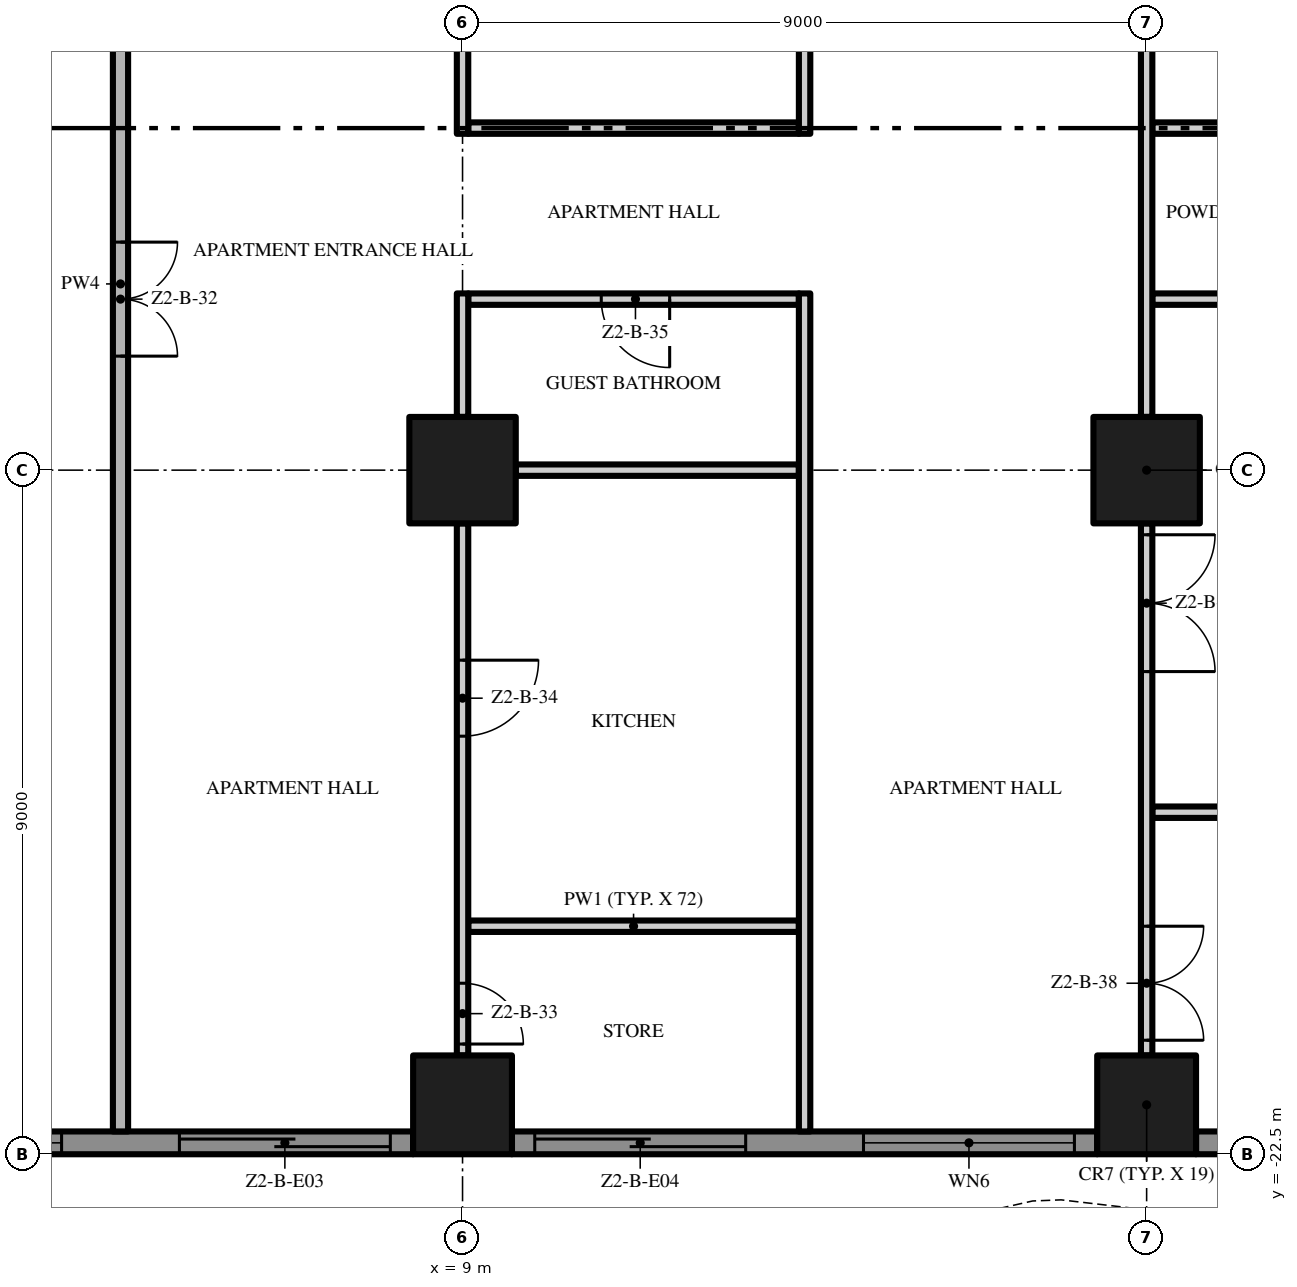
"""IFC4 building model, lengths in metres.
Left out: names, types, materials, properties, quantities, classifications, styles, units other than length and angle.
Written with IfcOpenShell. Run it as: python <this file> out.ifc"""

import sys

from ifc_helpers import new_model, si_unit, direction, frame, frame_2d, origin, origin_2d, place, context, subcontext, project, spatial, polyline, rectangle, outline, extrude, element, fill, save


model = new_model("IFC4")
c1 = context("Model", 3, precision=1e-05, world=origin(), true_north=direction((0.0, 1.0)))
c2 = subcontext(c1, "Body", "Model", "MODEL_VIEW")
j1 = project(units=[si_unit("LENGTHUNIT", "METRE"), si_unit("PLANEANGLEUNIT", "RADIAN")], contexts=[c1])
p1 = place(None, origin())
s1 = spatial("IfcSite", under=j1, at=p1, CompositionType="ELEMENT")
p2 = place(p1, origin())
s2 = spatial("IfcBuilding", under=s1, at=p2, CompositionType="ELEMENT")
p3 = place(p2, frame((0.0, 0.0, 80.8)))
s3 = spatial("IfcBuildingStorey", under=s2, at=p3, CompositionType="ELEMENT", Elevation=80.8)
p4 = place(p3, frame((18.0, -13.5, 0.0), z_axis=(0.0, 0.0, 1.0), x_axis=(1.0, 0.0, 0.0)))
e1 = element("IfcColumn", 1, at=p4, inside=s3, PredefinedType="COLUMN", context=c2, shape_type="SweptSolid", body=[
    extrude(rectangle(XDim=1.4, YDim=1.4, at=origin_2d()), origin(), (0.0, 0.0, 1.0), 3.5),
])
p5 = place(p3, frame((18.0, -21.85, 0.0), z_axis=(0.0, 0.0, 1.0), x_axis=(1.0, 0.0, 0.0)))
e2 = element("IfcColumn", 2, at=p5, inside=s3, PredefinedType="COLUMN", context=c2, shape_type="SweptSolid", body=[
    extrude(rectangle(XDim=1.3, YDim=1.3, at=origin_2d()), origin(), (0.0, 0.0, 1.0), 3.5),
])
p6 = place(p3, frame((9.0, -13.5, 0.0), z_axis=(0.0, 0.0, 1.0), x_axis=(1.0, 0.0, 0.0)))
e3 = element("IfcColumn", 3, at=p6, inside=s3, PredefinedType="COLUMN", context=c2, shape_type="SweptSolid", body=[
    extrude(rectangle(XDim=1.4, YDim=1.4, at=origin_2d()), origin(), (0.0, 0.0, 1.0), 3.5),
])
p7 = place(p3, frame((9.0, -21.85, 0.0), z_axis=(0.0, 0.0, 1.0), x_axis=(1.0, 0.0, 0.0)))
e4 = element("IfcColumn", 4, at=p7, inside=s3, PredefinedType="COLUMN", context=c2, shape_type="SweptSolid", body=[
    extrude(rectangle(XDim=1.3, YDim=1.3, at=origin_2d()), origin(), (0.0, 0.0, 1.0), 3.5),
])
p8 = place(p3, frame((8.35, -22.35, 0.0), z_axis=(0.0, 0.0, 1.0), x_axis=(-1.0, 0.0, 0.0)))
e5 = element("IfcWall", 5, at=p8, inside=s3, PredefinedType="SOLIDWALL", context=c2, shape_type="SweptSolid", body=[
    extrude(rectangle(XDim=7.7, YDim=0.3, at=frame_2d((3.85, 0.0))), origin(), (0.0, 0.0, 1.0), 3.5),
])
p9 = place(p8, frame((4.625, 0.0, 0.45)))
e6 = element("IfcOpeningElement", 6, at=p9, cuts=e5, PredefinedType="OPENING", context=c2, shape_type="SweptSolid", body=[
    extrude(rectangle(XDim=2.775, YDim=2.65, at=frame_2d((1.387, 1.325))), frame((0.0, 0.16, 0.0), z_axis=(0.0, -1.0, 0.0), x_axis=(1.0, 0.0, 0.0)), (0.0, 0.0, 1.0), 0.32),
])
p10 = place(p8, frame((0.3, 0.0, 0.0)))
e7 = element("IfcOpeningElement", 7, at=p10, cuts=e5, PredefinedType="OPENING", context=c2, shape_type="SweptSolid", body=[
    extrude(rectangle(XDim=2.775, YDim=2.4, at=frame_2d((1.387, 1.2))), frame((0.0, 0.16, 0.0), z_axis=(0.0, -1.0, 0.0), x_axis=(1.0, 0.0, 0.0)), (0.0, 0.0, 1.0), 0.32),
])
p11 = place(p3, frame((17.35, -22.35, 0.0), z_axis=(0.0, 0.0, 1.0), x_axis=(-1.0, 0.0, 0.0)))
e8 = element("IfcWall", 8, at=p11, inside=s3, PredefinedType="SOLIDWALL", context=c2, shape_type="SweptSolid", body=[
    extrude(rectangle(XDim=7.7, YDim=0.3, at=frame_2d((3.85, 0.0))), origin(), (0.0, 0.0, 1.0), 3.5),
])
p12 = place(p11, frame((4.625, 0.0, 0.0)))
e9 = element("IfcOpeningElement", 9, at=p12, cuts=e8, PredefinedType="OPENING", context=c2, shape_type="SweptSolid", body=[
    extrude(rectangle(XDim=2.775, YDim=2.4, at=frame_2d((1.387, 1.2))), frame((0.0, 0.16, 0.0), z_axis=(0.0, -1.0, 0.0), x_axis=(1.0, 0.0, 0.0)), (0.0, 0.0, 1.0), 0.32),
])
p13 = place(p11, frame((0.3, 0.0, 0.45)))
e10 = element("IfcOpeningElement", 10, at=p13, cuts=e8, PredefinedType="OPENING", context=c2, shape_type="SweptSolid", body=[
    extrude(rectangle(XDim=2.775, YDim=2.65, at=frame_2d((1.387, 1.325))), frame((0.0, 0.16, 0.0), z_axis=(0.0, -1.0, 0.0), x_axis=(1.0, 0.0, 0.0)), (0.0, 0.0, 1.0), 0.32),
])
p14 = place(p3, frame((22.5, -22.35, 0.0), z_axis=(0.0, 0.0, 1.0), x_axis=(-1.0, 0.0, 0.0)))
e11 = element("IfcWall", 11, at=p14, inside=s3, PredefinedType="SOLIDWALL", context=c2, shape_type="SweptSolid", body=[
    extrude(rectangle(XDim=3.85, YDim=0.3, at=frame_2d((1.925, 0.0))), origin(), (0.0, 0.0, 1.0), 3.5),
])
p15 = place(p14, frame((0.775, 0.0, 0.45)))
e12 = element("IfcOpeningElement", 12, at=p15, cuts=e11, PredefinedType="OPENING", context=c2, shape_type="SweptSolid", body=[
    extrude(rectangle(XDim=2.775, YDim=2.65, at=frame_2d((1.387, 1.325))), frame((0.0, 0.16, 0.0), z_axis=(0.0, -1.0, 0.0), x_axis=(1.0, 0.0, 0.0)), (0.0, 0.0, 1.0), 0.32),
])
p16 = place(p3, origin())
e13 = element("IfcWall", 13, at=p16, inside=s3, PredefinedType="USERDEFINED", context=c2, shape_type="SweptSolid", body=[
    extrude(outline(polyline([(-22.5, -25.149), (-21.0, -25.485), (-20.625, -25.5), (-19.5, -25.369), (-18.0, -24.845), (-16.5, -24.112), (-15.0, -23.451), (-13.5, -23.115), (-13.125, -23.1), (-12.0, -23.231), (-10.5, -23.755), (-9.0, -24.488), (-7.5, -25.149), (-6.0, -25.485), (-5.625, -25.5), (-4.5, -25.369), (-3.0, -24.845), (-1.5, -24.112), (0.0, -23.451), (1.5, -23.115), (1.875, -23.1), (3.0, -23.231), (4.5, -23.755), (6.0, -24.488), (7.5, -25.149), (9.0, -25.485), (9.375, -25.5), (10.5, -25.369), (12.0, -24.845), (13.5, -24.112), (15.0, -23.451), (16.5, -23.115), (16.875, -23.1), (18.0, -23.231), (19.5, -23.755), (21.0, -24.488), (22.5, -25.149), (22.601, -24.92), (21.105, -24.261), (19.596, -23.524), (18.056, -22.986), (16.885, -22.849), (16.467, -22.866), (14.921, -23.213), (13.395, -23.885), (11.904, -24.614), (10.444, -25.124), (9.365, -25.249), (9.033, -25.236), (7.579, -24.91), (6.105, -24.261), (4.596, -23.524), (3.056, -22.986), (1.885, -22.849), (1.467, -22.866), (-0.079, -23.213), (-1.605, -23.885), (-3.096, -24.614), (-4.556, -25.124), (-5.635, -25.249), (-5.967, -25.236), (-7.421, -24.91), (-8.895, -24.261), (-10.404, -23.524), (-11.944, -22.986), (-13.115, -22.849), (-13.533, -22.866), (-15.079, -23.213), (-16.605, -23.885), (-18.096, -24.614), (-19.556, -25.124), (-20.635, -25.249), (-20.967, -25.236), (-22.445, -24.905), (-22.5, -25.149)])), origin(), (0.0, 0.0, 1.0), 0.9),
])
p17 = place(p3, frame((9.075, -19.5, 0.0), z_axis=(0.0, 0.0, 1.0), x_axis=(1.0, 0.0, 0.0)))
e14 = element("IfcWall", 14, at=p17, inside=s3, PredefinedType="PARTITIONING", context=c2, shape_type="SweptSolid", body=[
    extrude(rectangle(XDim=4.35, YDim=0.15, at=frame_2d((2.175, 0.0))), origin(), (0.0, 0.0, 1.0), 3.5),
])
p18 = place(p3, frame((18.075, -18.0, 0.0), z_axis=(0.0, 0.0, 1.0), x_axis=(1.0, 0.0, 0.0)))
e15 = element("IfcWall", 15, at=p18, inside=s3, PredefinedType="PARTITIONING", context=c2, shape_type="SweptSolid", body=[
    extrude(rectangle(XDim=3.775, YDim=0.15, at=frame_2d((1.887, 0.0))), origin(), (0.0, 0.0, 1.0), 3.5),
])
p19 = place(p3, frame((9.7, -13.5, 0.0), z_axis=(0.0, 0.0, 1.0), x_axis=(1.0, 0.0, 0.0)))
e16 = element("IfcWall", 16, at=p19, inside=s3, PredefinedType="PARTITIONING", context=c2, shape_type="SweptSolid", body=[
    extrude(rectangle(XDim=3.725, YDim=0.15, at=frame_2d((1.863, 0.0))), origin(), (0.0, 0.0, 1.0), 3.5),
])
p20 = place(p3, frame((13.425, -11.25, 0.0), z_axis=(0.0, 0.0, 1.0), x_axis=(-1.0, 0.0, 0.0)))
e17 = element("IfcWall", 17, at=p20, inside=s3, PredefinedType="PARTITIONING", context=c2, shape_type="SweptSolid", body=[
    extrude(rectangle(XDim=4.35, YDim=0.15, at=frame_2d((2.175, 0.0))), origin(), (0.0, 0.0, 1.0), 3.5),
])
p21 = place(p20, frame((1.7, 0.0, 0.0)))
e18 = element("IfcOpeningElement", 18, at=p21, cuts=e17, PredefinedType="OPENING", context=c2, shape_type="SweptSolid", body=[
    extrude(rectangle(XDim=0.9, YDim=2.1, at=frame_2d((0.45, 1.05))), frame((0.0, 0.085, 0.0), z_axis=(0.0, -1.0, 0.0), x_axis=(1.0, 0.0, 0.0)), (0.0, 0.0, 1.0), 0.17),
])
p22 = place(p3, frame((18.075, -11.25, 0.0), z_axis=(0.0, 0.0, 1.0), x_axis=(1.0, 0.0, 0.0)))
e19 = element("IfcWall", 19, at=p22, inside=s3, PredefinedType="PARTITIONING", context=c2, shape_type="SweptSolid", body=[
    extrude(rectangle(XDim=2.85, YDim=0.15, at=frame_2d((1.425, 0.0))), origin(), (0.0, 0.0, 1.0), 3.5),
])
p23 = place(p3, frame((9.075, -9.0, 0.0), z_axis=(0.0, 0.0, 1.0), x_axis=(1.0, 0.0, 0.0)))
e20 = element("IfcWall", 20, at=p23, inside=s3, PredefinedType="PARTITIONING", context=c2, shape_type="SweptSolid", body=[
    extrude(rectangle(XDim=4.35, YDim=0.15, at=frame_2d((2.175, 0.0))), origin(), (0.0, 0.0, 1.0), 3.5),
])
p24 = place(p3, frame((18.075, -9.0, 0.0), z_axis=(0.0, 0.0, 1.0), x_axis=(1.0, 0.0, 0.0)))
e21 = element("IfcWall", 21, at=p24, inside=s3, PredefinedType="PARTITIONING", context=c2, shape_type="SweptSolid", body=[
    extrude(rectangle(XDim=2.85, YDim=0.15, at=frame_2d((1.425, 0.0))), origin(), (0.0, 0.0, 1.0), 3.5),
])
p25 = place(p3, frame((4.5, 0.1, 0.0), z_axis=(0.0, 0.0, 1.0), x_axis=(0.0, -1.0, 0.0)))
e22 = element("IfcWall", 22, at=p25, inside=s3, PredefinedType="PARTITIONING", context=c2, shape_type="SweptSolid", body=[
    extrude(rectangle(XDim=22.3, YDim=0.2, at=frame_2d((11.15, 0.0))), origin(), (0.0, 0.0, 1.0), 3.5),
])
p26 = place(p25, frame((10.6, 0.0, 0.0)))
e23 = element("IfcOpeningElement", 23, at=p26, cuts=e22, PredefinedType="OPENING", context=c2, shape_type="SweptSolid", body=[
    extrude(rectangle(XDim=1.5, YDim=2.4, at=frame_2d((0.75, 1.2))), frame((0.0, 0.11, 0.0), z_axis=(0.0, -1.0, 0.0), x_axis=(1.0, 0.0, 0.0)), (0.0, 0.0, 1.0), 0.22),
])
p27 = place(p3, frame((9.0, -14.2, 0.0), z_axis=(0.0, 0.0, 1.0), x_axis=(0.0, -1.0, 0.0)))
e24 = element("IfcWall", 24, at=p27, inside=s3, PredefinedType="PARTITIONING", context=c2, shape_type="SweptSolid", body=[
    extrude(rectangle(XDim=7.0, YDim=0.15, at=frame_2d((3.5, 0.0))), origin(), (0.0, 0.0, 1.0), 3.5),
])
p28 = place(p27, frame((6.05, 0.0, 0.0)))
e25 = element("IfcOpeningElement", 25, at=p28, cuts=e24, PredefinedType="OPENING", context=c2, shape_type="SweptSolid", body=[
    extrude(rectangle(XDim=0.8, YDim=2.0, at=frame_2d((0.4, 1.0))), frame((0.0, 0.085, 0.0), z_axis=(0.0, -1.0, 0.0), x_axis=(1.0, 0.0, 0.0)), (0.0, 0.0, 1.0), 0.17),
])
p29 = place(p27, frame((1.8, 0.0, 0.0)))
e26 = element("IfcOpeningElement", 26, at=p29, cuts=e24, PredefinedType="OPENING", context=c2, shape_type="SweptSolid", body=[
    extrude(rectangle(XDim=1.0, YDim=2.4, at=frame_2d((0.5, 1.2))), frame((0.0, 0.085, 0.0), z_axis=(0.0, -1.0, 0.0), x_axis=(1.0, 0.0, 0.0)), (0.0, 0.0, 1.0), 0.17),
])
p30 = place(p3, frame((9.0, -12.8, 0.0), z_axis=(0.0, 0.0, 1.0), x_axis=(0.0, 1.0, 0.0)))
e27 = element("IfcWall", 27, at=p30, inside=s3, PredefinedType="PARTITIONING", context=c2, shape_type="SweptSolid", body=[
    extrude(rectangle(XDim=1.625, YDim=0.15, at=frame_2d((0.812, 0.0))), origin(), (0.0, 0.0, 1.0), 3.5),
])
p31 = place(p3, frame((9.0, -5.2, 0.0), z_axis=(0.0, 0.0, 1.0), x_axis=(0.0, -1.0, 0.0)))
e28 = element("IfcWall", 28, at=p31, inside=s3, PredefinedType="PARTITIONING", context=c2, shape_type="SweptSolid", body=[
    extrude(rectangle(XDim=3.875, YDim=0.15, at=frame_2d((1.938, 0.0))), origin(), (0.0, 0.0, 1.0), 3.5),
])
p32 = place(p31, frame((0.75, 0.0, 0.0)))
e29 = element("IfcOpeningElement", 29, at=p32, cuts=e28, PredefinedType="OPENING", context=c2, shape_type="SweptSolid", body=[
    extrude(rectangle(XDim=0.9, YDim=2.1, at=frame_2d((0.45, 1.05))), frame((0.0, 0.085, 0.0), z_axis=(0.0, -1.0, 0.0), x_axis=(1.0, 0.0, 0.0)), (0.0, 0.0, 1.0), 0.17),
])
p33 = place(p3, frame((13.5, -22.2, 0.0), z_axis=(0.0, 0.0, 1.0), x_axis=(0.0, 1.0, 0.0)))
e30 = element("IfcWall", 30, at=p33, inside=s3, PredefinedType="PARTITIONING", context=c2, shape_type="SweptSolid", body=[
    extrude(rectangle(XDim=11.025, YDim=0.15, at=frame_2d((5.513, 0.0))), origin(), (0.0, 0.0, 1.0), 3.5),
])
p34 = place(p3, frame((13.5, -9.075, 0.0), z_axis=(0.0, 0.0, 1.0), x_axis=(0.0, 1.0, 0.0)))
e31 = element("IfcWall", 31, at=p34, inside=s3, PredefinedType="PARTITIONING", context=c2, shape_type="SweptSolid", body=[
    extrude(rectangle(XDim=8.975, YDim=0.15, at=frame_2d((4.487, 0.0))), origin(), (0.0, 0.0, 1.0), 3.5),
])
p35 = place(p3, frame((18.0, -14.2, 0.0), z_axis=(0.0, 0.0, 1.0), x_axis=(0.0, -1.0, 0.0)))
e32 = element("IfcWall", 32, at=p35, inside=s3, PredefinedType="PARTITIONING", context=c2, shape_type="SweptSolid", body=[
    extrude(rectangle(XDim=7.0, YDim=0.15, at=frame_2d((3.5, 0.0))), origin(), (0.0, 0.0, 1.0), 3.5),
])
p36 = place(p35, frame((5.3, 0.0, 0.0)))
e33 = element("IfcOpeningElement", 33, at=p36, cuts=e32, PredefinedType="OPENING", context=c2, shape_type="SweptSolid", body=[
    extrude(rectangle(XDim=1.5, YDim=2.4, at=frame_2d((0.75, 1.2))), frame((0.0, 0.085, 0.0), z_axis=(0.0, -1.0, 0.0), x_axis=(1.0, 0.0, 0.0)), (0.0, 0.0, 1.0), 0.17),
])
p37 = place(p35, frame((0.15, 0.0, 0.0)))
e34 = element("IfcOpeningElement", 34, at=p37, cuts=e32, PredefinedType="OPENING", context=c2, shape_type="SweptSolid", body=[
    extrude(rectangle(XDim=1.8, YDim=2.4, at=frame_2d((0.9, 1.2))), frame((0.0, 0.085, 0.0), z_axis=(0.0, -1.0, 0.0), x_axis=(1.0, 0.0, 0.0)), (0.0, 0.0, 1.0), 0.17),
])
p38 = place(p3, frame((18.0, -5.2, 0.0), z_axis=(0.0, 0.0, 1.0), x_axis=(0.0, -1.0, 0.0)))
e35 = element("IfcWall", 35, at=p38, inside=s3, PredefinedType="PARTITIONING", context=c2, shape_type="SweptSolid", body=[
    extrude(rectangle(XDim=7.6, YDim=0.15, at=frame_2d((3.8, 0.0))), origin(), (0.0, 0.0, 1.0), 3.5),
])
p39 = place(p38, frame((0.15, 0.0, 0.0)))
e36 = element("IfcOpeningElement", 36, at=p39, cuts=e35, PredefinedType="OPENING", context=c2, shape_type="SweptSolid", body=[
    extrude(rectangle(XDim=1.0, YDim=2.4, at=frame_2d((0.5, 1.2))), frame((0.0, 0.085, 0.0), z_axis=(0.0, -1.0, 0.0), x_axis=(1.0, 0.0, 0.0)), (0.0, 0.0, 1.0), 0.17),
])
p40 = place(p9, origin())
e37 = element("IfcWindow", 37, at=p40, inside=s3, PartitioningType="SINGLE_PANEL", PredefinedType="WINDOW", context=c2, shape_type="SweptSolid", body=[
    extrude(rectangle(XDim=2.775, YDim=2.65, at=frame_2d((1.387, 1.325))), frame((0.0, 0.03, 0.0), z_axis=(0.0, -1.0, 0.0), x_axis=(1.0, 0.0, 0.0)), (0.0, 0.0, 1.0), 0.06),
])
fill(e6, e37)
p41 = place(p10, origin())
e38 = element("IfcDoor", 38, at=p41, inside=s3, OperationType="SINGLE_SWING_LEFT", PredefinedType="DOOR", context=c2, shape_type="SweptSolid", body=[
    extrude(rectangle(XDim=2.775, YDim=2.4, at=frame_2d((1.387, 1.2))), frame((0.0, 0.025, 0.0), z_axis=(0.0, -1.0, 0.0), x_axis=(1.0, 0.0, 0.0)), (0.0, 0.0, 1.0), 0.05),
])
fill(e7, e38)
p42 = place(p12, origin())
e39 = element("IfcDoor", 39, at=p42, inside=s3, OperationType="SINGLE_SWING_LEFT", PredefinedType="DOOR", context=c2, shape_type="SweptSolid", body=[
    extrude(rectangle(XDim=2.775, YDim=2.4, at=frame_2d((1.387, 1.2))), frame((0.0, 0.025, 0.0), z_axis=(0.0, -1.0, 0.0), x_axis=(1.0, 0.0, 0.0)), (0.0, 0.0, 1.0), 0.05),
])
fill(e9, e39)
p43 = place(p13, origin())
e40 = element("IfcWindow", 40, at=p43, inside=s3, PartitioningType="SINGLE_PANEL", PredefinedType="WINDOW", context=c2, shape_type="SweptSolid", body=[
    extrude(rectangle(XDim=2.775, YDim=2.65, at=frame_2d((1.387, 1.325))), frame((0.0, 0.03, 0.0), z_axis=(0.0, -1.0, 0.0), x_axis=(1.0, 0.0, 0.0)), (0.0, 0.0, 1.0), 0.06),
])
fill(e10, e40)
p44 = place(p26, origin())
e41 = element("IfcDoor", 41, at=p44, inside=s3, OperationType="DOUBLE_DOOR_SINGLE_SWING", PredefinedType="DOOR", context=c2, shape_type="SweptSolid", body=[
    extrude(rectangle(XDim=1.5, YDim=2.4, at=frame_2d((0.75, 1.2))), frame((0.0, 0.025, 0.0), z_axis=(0.0, -1.0, 0.0), x_axis=(1.0, 0.0, 0.0)), (0.0, 0.0, 1.0), 0.05),
])
fill(e23, e41)
p45 = place(p28, origin())
e42 = element("IfcDoor", 42, at=p45, inside=s3, OperationType="SINGLE_SWING_RIGHT", PredefinedType="DOOR", context=c2, shape_type="SweptSolid", body=[
    extrude(rectangle(XDim=0.8, YDim=2.0, at=frame_2d((0.4, 1.0))), frame((0.0, 0.025, 0.0), z_axis=(0.0, -1.0, 0.0), x_axis=(1.0, 0.0, 0.0)), (0.0, 0.0, 1.0), 0.05),
])
fill(e25, e42)
p46 = place(p29, origin())
e43 = element("IfcDoor", 43, at=p46, inside=s3, OperationType="SINGLE_SWING_LEFT", PredefinedType="DOOR", context=c2, shape_type="SweptSolid", body=[
    extrude(rectangle(XDim=1.0, YDim=2.4, at=frame_2d((0.5, 1.2))), frame((0.0, 0.025, 0.0), z_axis=(0.0, -1.0, 0.0), x_axis=(1.0, 0.0, 0.0)), (0.0, 0.0, 1.0), 0.05),
])
fill(e26, e43)
p47 = place(p21, origin())
e44 = element("IfcDoor", 44, at=p47, inside=s3, OperationType="SINGLE_SWING_LEFT", PredefinedType="DOOR", context=c2, shape_type="SweptSolid", body=[
    extrude(rectangle(XDim=0.9, YDim=2.1, at=frame_2d((0.45, 1.05))), frame((0.0, 0.025, 0.0), z_axis=(0.0, -1.0, 0.0), x_axis=(1.0, 0.0, 0.0)), (0.0, 0.0, 1.0), 0.05),
])
fill(e18, e44)
p48 = place(p36, origin())
e45 = element("IfcDoor", 45, at=p48, inside=s3, OperationType="DOUBLE_DOOR_SINGLE_SWING", PredefinedType="DOOR", context=c2, shape_type="SweptSolid", body=[
    extrude(rectangle(XDim=1.5, YDim=2.4, at=frame_2d((0.75, 1.2))), frame((0.0, 0.025, 0.0), z_axis=(0.0, -1.0, 0.0), x_axis=(1.0, 0.0, 0.0)), (0.0, 0.0, 1.0), 0.05),
])
fill(e33, e45)
p49 = place(p37, origin())
e46 = element("IfcDoor", 46, at=p49, inside=s3, OperationType="DOUBLE_DOOR_SINGLE_SWING", PredefinedType="DOOR", context=c2, shape_type="SweptSolid", body=[
    extrude(rectangle(XDim=1.8, YDim=2.4, at=frame_2d((0.9, 1.2))), frame((0.0, 0.025, 0.0), z_axis=(0.0, -1.0, 0.0), x_axis=(1.0, 0.0, 0.0)), (0.0, 0.0, 1.0), 0.05),
])
fill(e34, e46)
save(model, sys.argv[1])
